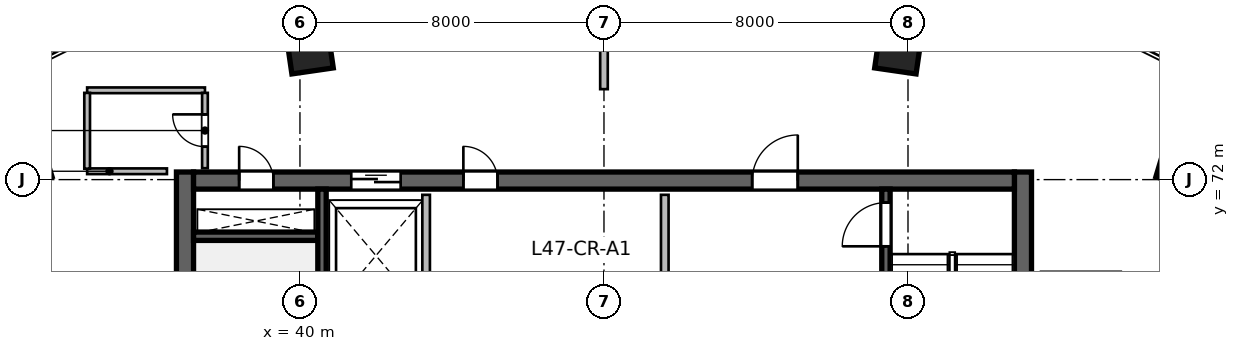
"""IFC4 building model, lengths in metres.
Left out: names, types, materials, properties, quantities, classifications, styles, units other than length and angle.
Written with IfcOpenShell. Run it as: python <this file> out.ifc"""

import sys

from ifc_helpers import new_model, si_unit, direction, frame, frame_2d, origin, origin_2d, place, context, subcontext, project, spatial, rectangle, extrude, source, transform, mapped, element, fill, save


model = new_model("IFC4")
c1 = context("Model", 3, precision=1e-05, world=origin(), true_north=direction((0.0, 1.0)))
c2 = subcontext(c1, "Body", "Model", "MODEL_VIEW")
j1 = project(units=[si_unit("LENGTHUNIT", "METRE"), si_unit("PLANEANGLEUNIT", "RADIAN")], contexts=[c1])
p1 = place(None, origin())
s1 = spatial("IfcSite", under=j1, at=p1, CompositionType="ELEMENT")
p2 = place(p1, origin())
s2 = spatial("IfcBuilding", under=s1, at=p2, CompositionType="ELEMENT")
p3 = place(p2, frame((0.0, 0.0, 194.4)))
s3 = spatial("IfcBuildingStorey", under=s2, at=p3, CompositionType="ELEMENT", Elevation=194.4)
m1 = source(origin(), c2, "Body", "SweptSolid", [
    extrude(rectangle(XDim=12.0, YDim=0.45, at=frame_2d((6.0, 0.0))), origin(), (0.0, 0.0, 1.0), 4.8),
])
for number, where, z_axis, x_axis in (
    (1, (36.975, 60.2, 0.0), (0.0, 0.0, 1.0), (0.0, 1.0, 0.0)),
    (2, (59.025, 60.2, 0.0), (0.0, 0.0, 1.0), (0.0, 1.0, 0.0)),
):
    element("IfcWall", number, at=place(p3, frame(where, z_axis=z_axis, x_axis=x_axis)), inside=s3, PredefinedType="SHEAR", context=c2, shape_type="MappedRepresentation", body=[
        mapped(m1, transform((0.0, 0.0, 0.0), scale=1.0)),
    ])
m2 = source(origin(), c2, "Body", "SweptSolid", [
    extrude(rectangle(XDim=21.6, YDim=0.45, at=frame_2d((10.8, 0.0))), origin(), (0.0, 0.0, 1.0), 4.8),
])
p4 = place(p3, frame((37.2, 71.975, 0.0), z_axis=(0.0, 0.0, 1.0), x_axis=(1.0, 0.0, 0.0)))
e3 = element("IfcWall", 3, at=p4, inside=s3, PredefinedType="SHEAR", context=c2, shape_type="MappedRepresentation", body=[
    mapped(m2, transform((0.0, 0.0, 0.0), scale=1.0)),
])
p5 = place(p4, frame((1.2, 0.0, 0.0)))
e4 = element("IfcOpeningElement", 4, at=p5, cuts=e3, PredefinedType="OPENING", context=c2, shape_type="SweptSolid", body=[
    extrude(rectangle(XDim=0.9, YDim=2.1, at=frame_2d((0.45, 1.05))), frame((0.0, 0.235, 0.0), z_axis=(0.0, -1.0, 0.0), x_axis=(1.0, 0.0, 0.0)), (0.0, 0.0, 1.0), 0.47),
])
p6 = place(p4, frame((14.7, 0.0, 0.0)))
e5 = element("IfcOpeningElement", 5, at=p6, cuts=e3, PredefinedType="OPENING", context=c2, shape_type="SweptSolid", body=[
    extrude(rectangle(XDim=1.2, YDim=2.15, at=frame_2d((0.6, 1.075))), frame((0.0, 0.235, 0.0), z_axis=(0.0, -1.0, 0.0), x_axis=(1.0, 0.0, 0.0)), (0.0, 0.0, 1.0), 0.47),
])
p7 = place(p4, frame((4.15, 0.0, 0.0)))
e6 = element("IfcOpeningElement", 6, at=p7, cuts=e3, PredefinedType="OPENING", context=c2, shape_type="SweptSolid", body=[
    extrude(rectangle(XDim=1.3, YDim=2.15, at=frame_2d((0.65, 1.075))), frame((0.0, 0.235, 0.0), z_axis=(0.0, -1.0, 0.0), x_axis=(1.0, 0.0, 0.0)), (0.0, 0.0, 1.0), 0.47),
])
p8 = place(p4, frame((7.1, 0.0, 0.0)))
e7 = element("IfcOpeningElement", 7, at=p8, cuts=e3, PredefinedType="OPENING", context=c2, shape_type="SweptSolid", body=[
    extrude(rectangle(XDim=0.9, YDim=2.1, at=frame_2d((0.45, 1.05))), frame((0.0, 0.235, 0.0), z_axis=(0.0, -1.0, 0.0), x_axis=(1.0, 0.0, 0.0)), (0.0, 0.0, 1.0), 0.47),
])
m3 = source(origin(), c2, "Body", "SweptSolid", [
    extrude(rectangle(XDim=3.27, YDim=0.22, at=frame_2d((1.635, 0.0))), origin(), (0.0, 0.0, 1.0), 4.8),
])
p9 = place(p3, frame((37.2, 70.51, 0.0), z_axis=(0.0, 0.0, 1.0), x_axis=(1.0, 0.0, 0.0)))
e8 = element("IfcWall", 8, at=p9, inside=s3, PredefinedType="SHEAR", context=c2, shape_type="MappedRepresentation", body=[
    mapped(m3, transform((0.0, 0.0, 0.0), scale=1.0)),
])
m4 = source(origin(), c2, "Body", "SweptSolid", [
    extrude(rectangle(XDim=11.1, YDim=0.22, at=frame_2d((5.55, 0.0))), origin(), (0.0, 0.0, 1.0), 4.8),
])
p10 = place(p3, frame((40.58, 60.65, 0.0), z_axis=(0.0, 0.0, 1.0), x_axis=(0.0, 1.0, 0.0)))
e9 = element("IfcWall", 9, at=p10, inside=s3, PredefinedType="SHEAR", context=c2, shape_type="MappedRepresentation", body=[
    mapped(m4, transform((0.0, 0.0, 0.0), scale=1.0)),
])
p11 = place(p3, frame((55.42, 60.65, 0.0), z_axis=(0.0, 0.0, 1.0), x_axis=(0.0, 1.0, 0.0)))
e10 = element("IfcWall", 10, at=p11, inside=s3, PredefinedType="SHEAR", context=c2, shape_type="MappedRepresentation", body=[
    mapped(m4, transform((0.0, 0.0, 0.0), scale=1.0)),
])
p12 = place(p11, frame((9.595, 0.0, 0.0)))
e11 = element("IfcOpeningElement", 11, at=p12, cuts=e10, PredefinedType="OPENING", context=c2, shape_type="SweptSolid", body=[
    extrude(rectangle(XDim=1.15, YDim=2.15, at=frame_2d((0.575, 1.075))), frame((0.0, 0.12, 0.0), z_axis=(0.0, -1.0, 0.0), x_axis=(1.0, 0.0, 0.0)), (0.0, 0.0, 1.0), 0.24),
])
m5 = source(origin(), c2, "Body", "SweptSolid", [
    extrude(rectangle(XDim=1.1, YDim=1.1, at=origin_2d()), origin(), (0.0, 0.0, 1.0), 4.8),
])
for number, where, z_axis, x_axis in (
    (12, (32.791, 72.442, 0.0), (0.0, 0.0, 1.0), (-0.289, 0.957, 0.0)),
    (13, (40.253, 75.404, 0.0), (0.0, 0.0, 1.0), (-0.143, 0.99, 0.0)),
    (14, (55.747, 75.404, 0.0), (0.0, 0.0, 1.0), (0.143, 0.99, 0.0)),
    (15, (63.209, 72.442, 0.0), (0.0, 0.0, 1.0), (0.289, 0.957, 0.0)),
):
    element("IfcColumn", number, at=place(p3, frame(where, z_axis=z_axis, x_axis=x_axis)), inside=s3, PredefinedType="COLUMN", context=c2, shape_type="MappedRepresentation", body=[
        mapped(m5, transform((0.0, 0.0, 0.0), scale=1.0)),
    ])
m6 = source(origin(), c2, "Body", "SweptSolid", [
    extrude(rectangle(XDim=5.8, YDim=0.2, at=frame_2d((2.9, 0.0))), origin(), (0.0, 0.0, 1.0), 4.54),
])
p13 = place(p3, frame((49.6, 65.8, 0.0), z_axis=(0.0, 0.0, 1.0), x_axis=(0.0, 1.0, 0.0)))
e16 = element("IfcWall", 16, at=p13, inside=s3, PredefinedType="SOLIDWALL", context=c2, shape_type="MappedRepresentation", body=[
    mapped(m6, transform((0.0, 0.0, 0.0), scale=1.0)),
])
m7 = source(origin(), c2, "Body", "SweptSolid", [
    extrude(rectangle(XDim=3.2, YDim=0.2, at=frame_2d((1.6, 0.0))), origin(), (0.0, 0.0, 1.0), 4.54),
])
p14 = place(p3, frame((43.32, 68.4, 0.0), z_axis=(0.0, 0.0, 1.0), x_axis=(0.0, 1.0, 0.0)))
e17 = element("IfcWall", 17, at=p14, inside=s3, PredefinedType="SOLIDWALL", context=c2, shape_type="MappedRepresentation", body=[
    mapped(m7, transform((0.0, 0.0, 0.0), scale=1.0)),
])
m8 = source(origin(), c2, "Body", "SweptSolid", [
    extrude(rectangle(XDim=2.1, YDim=0.15, at=frame_2d((1.05, 0.0))), origin(), (0.0, 0.0, 1.0), 4.54),
])
p15 = place(p3, frame((34.4, 72.22, 0.0), z_axis=(0.0, 0.0, 1.0), x_axis=(1.0, 0.0, 0.0)))
e18 = element("IfcWall", 18, at=p15, inside=s3, PredefinedType="PARTITIONING", context=c2, shape_type="MappedRepresentation", body=[
    mapped(m8, transform((0.0, 0.0, 0.0), scale=1.0)),
])
m9 = source(origin(), c2, "Body", "SweptSolid", [
    extrude(rectangle(XDim=3.1, YDim=0.15, at=frame_2d((1.55, 0.0))), origin(), (0.0, 0.0, 1.0), 2.425),
])
p16 = place(p3, frame((34.4, 74.35, 0.0), z_axis=(0.0, 0.0, 1.0), x_axis=(1.0, 0.0, 0.0)))
e19 = element("IfcWall", 19, at=p16, inside=s3, PredefinedType="PARTITIONING", context=c2, shape_type="MappedRepresentation", body=[
    mapped(m9, transform((0.0, 0.0, 0.0), scale=1.0)),
])
m10 = source(origin(), c2, "Body", "SweptSolid", [
    extrude(rectangle(XDim=1.995, YDim=0.15, at=frame_2d((0.998, 0.0))), origin(), (0.0, 0.0, 1.0), 4.54),
])
p17 = place(p3, frame((34.4, 72.288, 0.0), z_axis=(0.0, 0.0, 1.0), x_axis=(0.0, 1.0, 0.0)))
e20 = element("IfcWall", 20, at=p17, inside=s3, PredefinedType="PARTITIONING", context=c2, shape_type="MappedRepresentation", body=[
    mapped(m10, transform((0.0, 0.0, 0.0), scale=1.0)),
])
m11 = source(origin(), c2, "Body", "SweptSolid", [
    extrude(rectangle(XDim=1.982, YDim=0.15, at=frame_2d((0.991, 0.0))), origin(), (0.0, 0.0, 1.0), 4.54),
])
p18 = place(p3, frame((37.5, 72.3, 0.0), z_axis=(0.0, 0.0, 1.0), x_axis=(0.0, 1.0, 0.0)))
e21 = element("IfcWall", 21, at=p18, inside=s3, PredefinedType="PARTITIONING", context=c2, shape_type="MappedRepresentation", body=[
    mapped(m11, transform((0.0, 0.0, 0.0), scale=1.0)),
])
p19 = place(p18, frame((0.566, 0.0, 0.0)))
e22 = element("IfcOpeningElement", 22, at=p19, cuts=e21, PredefinedType="OPENING", context=c2, shape_type="SweptSolid", body=[
    extrude(rectangle(XDim=0.85, YDim=2.1, at=frame_2d((0.425, 1.05))), frame((0.0, 0.085, 0.0), z_axis=(0.0, -1.0, 0.0), x_axis=(1.0, 0.0, 0.0)), (0.0, 0.0, 1.0), 0.17),
])
m12 = source(origin(), c2, "Body", "SweptSolid", [
    extrude(rectangle(XDim=4.246, YDim=0.2, at=frame_2d((2.123, 0.0))), origin(), (0.0, 0.0, 1.0), 3.898),
])
p20 = place(p3, frame((48.0, 74.38, 0.0), z_axis=(0.0, 0.0, 1.0), x_axis=(0.0, 1.0, 0.0)))
e23 = element("IfcWall", 23, at=p20, inside=s3, PredefinedType="SOLIDWALL", context=c2, shape_type="MappedRepresentation", body=[
    mapped(m12, transform((0.0, 0.0, 0.0), scale=1.0)),
])
m13 = source(origin(), c2, "Body", "SweptSolid", [
    extrude(rectangle(XDim=0.9, YDim=2.1, at=frame_2d((0.45, 1.05))), frame((0.0, 0.025, 0.0), z_axis=(0.0, -1.0, 0.0), x_axis=(1.0, 0.0, 0.0)), (0.0, 0.0, 1.0), 0.05),
])
p21 = place(p5, origin())
e24 = element("IfcDoor", 24, at=p21, inside=s3, OperationType="SINGLE_SWING_LEFT", PredefinedType="DOOR", context=c2, shape_type="MappedRepresentation", body=[
    mapped(m13, transform((0.0, 0.0, 0.0), scale=1.0)),
])
fill(e4, e24)
m14 = source(origin(), c2, "Body", "SweptSolid", [
    extrude(rectangle(XDim=1.15, YDim=2.15, at=frame_2d((0.575, 1.075))), frame((0.0, 0.025, 0.0), z_axis=(0.0, -1.0, 0.0), x_axis=(1.0, 0.0, 0.0)), (0.0, 0.0, 1.0), 0.05),
])
p22 = place(p12, origin())
e25 = element("IfcDoor", 25, at=p22, inside=s3, OperationType="SINGLE_SWING_LEFT", PredefinedType="DOOR", context=c2, shape_type="MappedRepresentation", body=[
    mapped(m14, transform((0.0, 0.0, 0.0), scale=1.0)),
])
fill(e11, e25)
m15 = source(origin(), c2, "Body", "SweptSolid", [
    extrude(rectangle(XDim=1.2, YDim=2.15, at=frame_2d((0.6, 1.075))), frame((0.0, 0.025, 0.0), z_axis=(0.0, -1.0, 0.0), x_axis=(1.0, 0.0, 0.0)), (0.0, 0.0, 1.0), 0.05),
])
p23 = place(p6, origin())
e26 = element("IfcDoor", 26, at=p23, inside=s3, OperationType="SINGLE_SWING_RIGHT", PredefinedType="DOOR", context=c2, shape_type="MappedRepresentation", body=[
    mapped(m15, transform((0.0, 0.0, 0.0), scale=1.0)),
])
fill(e5, e26)
m16 = source(origin(), c2, "Body", "SweptSolid", [
    extrude(rectangle(XDim=1.3, YDim=2.15, at=frame_2d((0.65, 1.075))), frame((0.0, 0.025, 0.0), z_axis=(0.0, -1.0, 0.0), x_axis=(1.0, 0.0, 0.0)), (0.0, 0.0, 1.0), 0.05),
])
p24 = place(p7, origin())
e27 = element("IfcDoor", 27, at=p24, inside=s3, OperationType="DOUBLE_DOOR_SLIDING", PredefinedType="DOOR", context=c2, shape_type="MappedRepresentation", body=[
    mapped(m16, transform((0.0, 0.0, 0.0), scale=1.0)),
])
fill(e6, e27)
p25 = place(p8, origin())
e28 = element("IfcDoor", 28, at=p25, inside=s3, OperationType="SINGLE_SWING_LEFT", PredefinedType="DOOR", context=c2, shape_type="MappedRepresentation", body=[
    mapped(m13, transform((0.0, 0.0, 0.0), scale=1.0)),
])
fill(e7, e28)
m17 = source(origin(), c2, "Body", "SweptSolid", [
    extrude(rectangle(XDim=0.85, YDim=2.1, at=frame_2d((0.425, 1.05))), frame((0.0, 0.025, 0.0), z_axis=(0.0, -1.0, 0.0), x_axis=(1.0, 0.0, 0.0)), (0.0, 0.0, 1.0), 0.05),
])
p26 = place(p19, origin())
e29 = element("IfcDoor", 29, at=p26, inside=s3, OperationType="SINGLE_SWING_RIGHT", PredefinedType="DOOR", context=c2, shape_type="MappedRepresentation", body=[
    mapped(m17, transform((0.0, 0.0, 0.0), scale=1.0)),
])
fill(e22, e29)
save(model, sys.argv[1])
